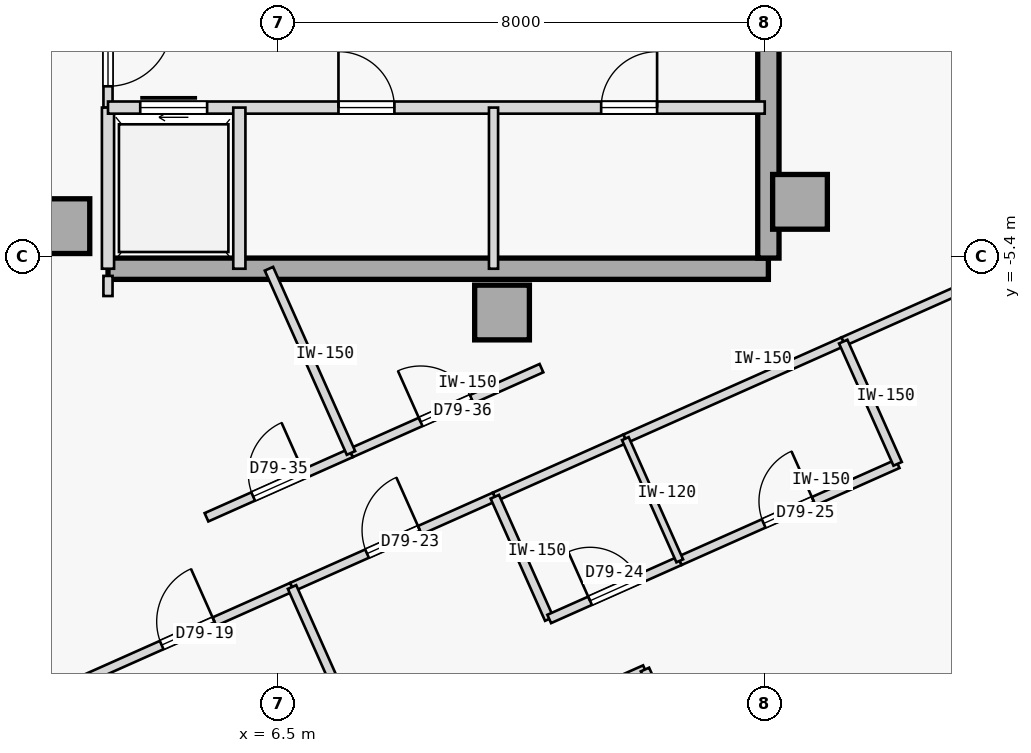
"""IFC4 building model, lengths in metres.
Left out: names, types, materials, properties, quantities, classifications, styles, units other than length and angle.
Written with IfcOpenShell. Run it as: python <this file> out.ifc"""

import sys

from ifc_helpers import new_model, si_unit, direction, frame, frame_2d, origin, origin_2d, place, context, subcontext, project, spatial, rectangle, extrude, element, fill, save


model = new_model("IFC4")
c1 = context("Model", 3, precision=1e-05, world=origin(), true_north=direction((0.0, 1.0)))
c2 = subcontext(c1, "Body", "Model", "MODEL_VIEW")
j1 = project(units=[si_unit("LENGTHUNIT", "METRE"), si_unit("PLANEANGLEUNIT", "RADIAN")], contexts=[c1])
p1 = place(None, origin())
s1 = spatial("IfcSite", under=j1, at=p1, CompositionType="ELEMENT")
p2 = place(p1, origin())
s2 = spatial("IfcBuilding", under=s1, at=p2, CompositionType="ELEMENT")
p3 = place(p2, frame((0.0, 0.0, 295.3)))
s3 = spatial("IfcBuildingStorey", under=s2, at=p3, CompositionType="ELEMENT", Elevation=295.3)
for number, where, z_axis, x_axis in (
    (1, (15.08, -4.5, 0.0), (0.0, 0.0, 1.0), (1.0, 0.0, 0.0)),
    (2, (10.18, -6.32, 0.0), (0.0, 0.0, 1.0), (1.0, 0.0, 0.0)),
    (3, (2.95, -4.9, 0.0), (0.0, 0.0, 1.0), (1.0, 0.0, 0.0)),
):
    element("IfcColumn", number, at=place(p3, frame(where, z_axis=z_axis, x_axis=x_axis)), inside=s3, PredefinedType="COLUMN", context=c2, shape_type="SweptSolid", body=[
        extrude(rectangle(XDim=0.9, YDim=0.9, at=origin_2d()), origin(), (0.0, 0.0, 1.0), 3.35),
    ])
p4 = place(p3, frame((3.7, -5.6, 0.0), z_axis=(0.0, 0.0, 1.0), x_axis=(1.0, 0.0, 0.0)))
e4 = element("IfcWall", 4, at=p4, inside=s3, PredefinedType="SHEAR", context=c2, shape_type="SweptSolid", body=[
    extrude(rectangle(XDim=10.86, YDim=0.35, at=frame_2d((5.43, 0.0))), origin(), (0.0, 0.0, 1.0), 3.125),
])
p5 = place(p3, frame((14.56, -5.425, 0.0), z_axis=(0.0, 0.0, 1.0), x_axis=(0.0, 1.0, 0.0)))
e5 = element("IfcWall", 5, at=p5, inside=s3, PredefinedType="SHEAR", context=c2, shape_type="SweptSolid", body=[
    extrude(rectangle(XDim=10.85, YDim=0.35, at=frame_2d((5.425, 0.0))), origin(), (0.0, 0.0, 1.0), 3.125),
])
p6 = place(p3, frame((3.7, -2.95, 0.0), z_axis=(0.0, 0.0, 1.0), x_axis=(0.0, 1.0, 0.0)))
e6 = element("IfcWall", 6, at=p6, inside=s3, PredefinedType="PARTITIONING", context=c2, shape_type="SweptSolid", body=[
    extrude(rectangle(XDim=1.8, YDim=0.15, at=frame_2d((0.9, 0.0))), origin(), (0.0, 0.0, 1.0), 3.125),
])
p7 = place(p6, frame((0.35, 0.0, 0.0)))
e7 = element("IfcOpeningElement", 7, at=p7, cuts=e6, PredefinedType="OPENING", context=c2, shape_type="SweptSolid", body=[
    extrude(rectangle(XDim=1.05, YDim=2.18, at=frame_2d((0.525, 1.09))), frame((0.0, 0.085, 0.0), z_axis=(0.0, -1.0, 0.0), x_axis=(1.0, 0.0, 0.0)), (0.0, 0.0, 1.0), 0.17),
])
p8 = place(p3, frame((3.7, -5.6, 0.0), z_axis=(0.0, 0.0, 1.0), x_axis=(0.0, 1.0, 0.0)))
e8 = element("IfcWall", 8, at=p8, inside=s3, PredefinedType="STANDARD", context=c2, shape_type="SweptSolid", body=[
    extrude(rectangle(XDim=2.65, YDim=0.2, at=frame_2d((1.325, 0.0))), origin(), (0.0, 0.0, 1.0), 3.125),
])
p9 = place(p3, frame((3.7, -2.95, 0.0), z_axis=(0.0, 0.0, 1.0), x_axis=(1.0, 0.0, 0.0)))
e9 = element("IfcWall", 9, at=p9, inside=s3, PredefinedType="STANDARD", context=c2, shape_type="SweptSolid", body=[
    extrude(rectangle(XDim=10.8, YDim=0.2, at=frame_2d((5.4, 0.0))), origin(), (0.0, 0.0, 1.0), 3.125),
])
p10 = place(p9, frame((0.53, 0.0, 0.0)))
e10 = element("IfcOpeningElement", 10, at=p10, cuts=e9, PredefinedType="OPENING", context=c2, shape_type="SweptSolid", body=[
    extrude(rectangle(XDim=1.1, YDim=2.15, at=frame_2d((0.55, 1.075))), frame((0.0, 0.11, 0.0), z_axis=(0.0, -1.0, 0.0), x_axis=(1.0, 0.0, 0.0)), (0.0, 0.0, 1.0), 0.22),
])
p11 = place(p9, frame((3.79, 0.0, 0.0)))
e11 = element("IfcOpeningElement", 11, at=p11, cuts=e9, PredefinedType="OPENING", context=c2, shape_type="SweptSolid", body=[
    extrude(rectangle(XDim=0.92, YDim=2.15, at=frame_2d((0.46, 1.075))), frame((0.0, 0.11, 0.0), z_axis=(0.0, -1.0, 0.0), x_axis=(1.0, 0.0, 0.0)), (0.0, 0.0, 1.0), 0.22),
])
p12 = place(p9, frame((8.11, 0.0, 0.0)))
e12 = element("IfcOpeningElement", 12, at=p12, cuts=e9, PredefinedType="OPENING", context=c2, shape_type="SweptSolid", body=[
    extrude(rectangle(XDim=0.92, YDim=2.15, at=frame_2d((0.46, 1.075))), frame((0.0, 0.11, 0.0), z_axis=(0.0, -1.0, 0.0), x_axis=(1.0, 0.0, 0.0)), (0.0, 0.0, 1.0), 0.22),
])
p13 = place(p3, frame((5.86, -5.6, 0.0), z_axis=(0.0, 0.0, 1.0), x_axis=(0.0, 1.0, 0.0)))
e13 = element("IfcWall", 13, at=p13, inside=s3, PredefinedType="STANDARD", context=c2, shape_type="SweptSolid", body=[
    extrude(rectangle(XDim=2.65, YDim=0.2, at=frame_2d((1.325, 0.0))), origin(), (0.0, 0.0, 1.0), 3.125),
])
p14 = place(p3, frame((10.04, -5.6, 0.0), z_axis=(0.0, 0.0, 1.0), x_axis=(0.0, 1.0, 0.0)))
e14 = element("IfcWall", 14, at=p14, inside=s3, PredefinedType="PARTITIONING", context=c2, shape_type="SweptSolid", body=[
    extrude(rectangle(XDim=2.65, YDim=0.15, at=frame_2d((1.325, 0.0))), origin(), (0.0, 0.0, 1.0), 3.125),
])
p15 = place(p3, frame((3.306, -12.357, 0.0), z_axis=(0.0, 0.0, 1.0), x_axis=(0.913550513402, 0.406725287464, 0.0)))
e15 = element("IfcWall", 15, at=p15, inside=s3, PredefinedType="PARTITIONING", context=c2, shape_type="SweptSolid", body=[
    extrude(rectangle(XDim=3.744, YDim=0.15, at=frame_2d((1.872, 0.0))), origin(), (0.0, 0.0, 1.0), 3.125),
])
p16 = place(p15, frame((1.397, 0.0, 0.0)))
e16 = element("IfcOpeningElement", 16, at=p16, cuts=e15, PredefinedType="OPENING", context=c2, shape_type="SweptSolid", body=[
    extrude(rectangle(XDim=0.95, YDim=2.15, at=frame_2d((0.475, 1.075))), frame((0.0, 0.085, 0.0), z_axis=(0.0, -1.0, 0.0), x_axis=(1.0, 0.0, 0.0)), (0.0, 0.0, 1.0), 0.17),
])
p17 = place(p3, frame((6.727, -10.834, 0.0), z_axis=(0.0, 0.0, 1.0), x_axis=(0.913543802, 0.40674036169, 0.0)))
e17 = element("IfcWall", 17, at=p17, inside=s3, PredefinedType="PARTITIONING", context=c2, shape_type="SweptSolid", body=[
    extrude(rectangle(XDim=3.65, YDim=0.15, at=frame_2d((1.825, 0.0))), origin(), (0.0, 0.0, 1.0), 3.125),
])
p18 = place(p17, frame((1.35, 0.0, 0.0)))
e18 = element("IfcOpeningElement", 18, at=p18, cuts=e17, PredefinedType="OPENING", context=c2, shape_type="SweptSolid", body=[
    extrude(rectangle(XDim=0.95, YDim=2.15, at=frame_2d((0.475, 1.075))), frame((0.0, 0.085, 0.0), z_axis=(0.0, -1.0, 0.0), x_axis=(1.0, 0.0, 0.0)), (0.0, 0.0, 1.0), 0.17),
])
p19 = place(p3, frame((15.791, -6.799, 0.0), z_axis=(0.0, 0.0, 1.0), x_axis=(0.913543802, 0.40674036169, 0.0)))
e19 = element("IfcWall", 19, at=p19, inside=s3, PredefinedType="PARTITIONING", context=c2, shape_type="SweptSolid", body=[
    extrude(rectangle(XDim=3.65, YDim=0.15, at=frame_2d((1.825, 0.0))), origin(), (0.0, 0.0, 1.0), 3.125),
])
p20 = place(p3, frame((10.061, -9.35, 0.0), z_axis=(0.0, 0.0, 1.0), x_axis=(0.913558622212, 0.406707073682, 0.0)))
e20 = element("IfcWall", 20, at=p20, inside=s3, PredefinedType="PARTITIONING", context=c2, shape_type="SweptSolid", body=[
    extrude(rectangle(XDim=2.35, YDim=0.15, at=frame_2d((1.175, 0.0))), origin(), (0.0, 0.0, 1.0), 3.125),
])
p21 = place(p3, frame((12.208, -8.394, 0.0), z_axis=(0.0, 0.0, 1.0), x_axis=(0.913539234326, 0.406750620585, 0.0)))
e21 = element("IfcWall", 21, at=p21, inside=s3, PredefinedType="PARTITIONING", context=c2, shape_type="SweptSolid", body=[
    extrude(rectangle(XDim=3.922, YDim=0.15, at=frame_2d((1.961, 0.0))), origin(), (0.0, 0.0, 1.0), 3.125),
])
p22 = place(p3, frame((5.32, -9.688, 0.0), z_axis=(0.0, 0.0, 1.0), x_axis=(0.913559784164, 0.406704463658, 0.0)))
e22 = element("IfcWall", 22, at=p22, inside=s3, PredefinedType="PARTITIONING", context=c2, shape_type="SweptSolid", body=[
    extrude(rectangle(XDim=2.601, YDim=0.15, at=frame_2d((1.301, 0.0))), origin(), (0.0, 0.0, 1.0), 3.125),
])
p23 = place(p22, frame((0.841, 0.0, 0.0)))
e23 = element("IfcOpeningElement", 23, at=p23, cuts=e22, PredefinedType="OPENING", context=c2, shape_type="SweptSolid", body=[
    extrude(rectangle(XDim=0.92, YDim=2.15, at=frame_2d((0.46, 1.075))), frame((0.0, 0.085, 0.0), z_axis=(0.0, -1.0, 0.0), x_axis=(1.0, 0.0, 0.0)), (0.0, 0.0, 1.0), 0.17),
])
p24 = place(p3, frame((3.699, -6.049, 0.0), z_axis=(0.0, 0.0, 1.0), x_axis=(0.001476013152, 0.999998910692, 0.0)))
e24 = element("IfcWall", 24, at=p24, inside=s3, PredefinedType="PARTITIONING", context=c2, shape_type="SweptSolid", body=[
    extrude(rectangle(XDim=0.331, YDim=0.15, at=frame_2d((0.166, 0.0))), origin(), (0.0, 0.0, 1.0), 3.125),
])
p25 = place(p3, frame((7.696, -8.63, 0.0), z_axis=(0.0, 0.0, 1.0), x_axis=(0.913526514415, 0.406779187596, 0.0)))
e25 = element("IfcWall", 25, at=p25, inside=s3, PredefinedType="PARTITIONING", context=c2, shape_type="SweptSolid", body=[
    extrude(rectangle(XDim=3.429, YDim=0.15, at=frame_2d((1.714, 0.0))), origin(), (0.0, 0.0, 1.0), 3.125),
])
p26 = place(p25, frame((1.254, 0.0, 0.0)))
e26 = element("IfcOpeningElement", 26, at=p26, cuts=e25, PredefinedType="OPENING", context=c2, shape_type="SweptSolid", body=[
    extrude(rectangle(XDim=0.92, YDim=2.15, at=frame_2d((0.46, 1.075))), frame((0.0, 0.085, 0.0), z_axis=(0.0, -1.0, 0.0), x_axis=(1.0, 0.0, 0.0)), (0.0, 0.0, 1.0), 0.17),
])
p27 = place(p3, frame((10.605, -19.545, 0.0), z_axis=(0.0, 0.0, 1.0), x_axis=(-0.406760810574, 0.913534697196, 0.0)))
e27 = element("IfcWall", 27, at=p27, inside=s3, PredefinedType="PARTITIONING", context=c2, shape_type="SweptSolid", body=[
    extrude(rectangle(XDim=9.535, YDim=0.15, at=frame_2d((4.768, 0.0))), origin(), (0.0, 0.0, 1.0), 3.125),
])
p28 = place(p3, frame((10.956, -11.36, 0.0), z_axis=(0.0, 0.0, 1.0), x_axis=(-0.406725294076, 0.913550510459, 0.0)))
e28 = element("IfcWall", 28, at=p28, inside=s3, PredefinedType="PARTITIONING", context=c2, shape_type="SweptSolid", body=[
    extrude(rectangle(XDim=2.2, YDim=0.15, at=frame_2d((1.1, 0.0))), origin(), (0.0, 0.0, 1.0), 3.125),
])
p29 = place(p3, frame((10.956, -11.36, 0.0), z_axis=(0.0, 0.0, 1.0), x_axis=(0.913558622212, 0.406707073682, 0.0)))
e29 = element("IfcWall", 29, at=p29, inside=s3, PredefinedType="PARTITIONING", context=c2, shape_type="SweptSolid", body=[
    extrude(rectangle(XDim=2.35, YDim=0.15, at=frame_2d((1.175, 0.0))), origin(), (0.0, 0.0, 1.0), 3.125),
])
p30 = place(p29, frame((0.735, 0.0, 0.0)))
e30 = element("IfcOpeningElement", 30, at=p30, cuts=e29, PredefinedType="OPENING", context=c2, shape_type="SweptSolid", body=[
    extrude(rectangle(XDim=0.88, YDim=2.15, at=frame_2d((0.44, 1.075))), frame((0.0, 0.085, 0.0), z_axis=(0.0, -1.0, 0.0), x_axis=(1.0, 0.0, 0.0)), (0.0, 0.0, 1.0), 0.17),
])
p31 = place(p3, frame((13.103, -10.404, 0.0), z_axis=(0.0, 0.0, 1.0), x_axis=(0.913549532696, 0.406727490232, 0.0)))
e31 = element("IfcWall", 31, at=p31, inside=s3, PredefinedType="PARTITIONING", context=c2, shape_type="SweptSolid", body=[
    extrude(rectangle(XDim=3.922, YDim=0.15, at=frame_2d((1.961, 0.0))), origin(), (0.0, 0.0, 1.0), 3.125),
])
p32 = place(p31, frame((1.511, 0.0, 0.0)))
e32 = element("IfcOpeningElement", 32, at=p32, cuts=e31, PredefinedType="OPENING", context=c2, shape_type="SweptSolid", body=[
    extrude(rectangle(XDim=0.9, YDim=2.15, at=frame_2d((0.45, 1.075))), frame((0.0, 0.085, 0.0), z_axis=(0.0, -1.0, 0.0), x_axis=(1.0, 0.0, 0.0)), (0.0, 0.0, 1.0), 0.17),
])
p33 = place(p3, frame((16.686, -8.809, 0.0), z_axis=(0.0, 0.0, 1.0), x_axis=(-0.406817905151, 0.913509273105, 0.0)))
e33 = element("IfcWall", 33, at=p33, inside=s3, PredefinedType="PARTITIONING", context=c2, shape_type="SweptSolid", body=[
    extrude(rectangle(XDim=2.2, YDim=0.15, at=frame_2d((1.1, 0.0))), origin(), (0.0, 0.0, 1.0), 3.125),
])
p34 = place(p3, frame((8.282, -14.083, 0.0), z_axis=(0.0, 0.0, 1.0), x_axis=(0.91354505039, 0.40673755778, 0.0)))
e34 = element("IfcWall", 34, at=p34, inside=s3, PredefinedType="PARTITIONING", context=c2, shape_type="SweptSolid", body=[
    extrude(rectangle(XDim=4.65, YDim=0.15, at=frame_2d((2.325, 0.0))), origin(), (0.0, 0.0, 1.0), 3.125),
])
p35 = place(p3, frame((14.944, -17.613, 0.0), z_axis=(0.0, 0.0, 1.0), x_axis=(-0.406714717734, 0.913555219119, 0.0)))
e35 = element("IfcWall", 35, at=p35, inside=s3, PredefinedType="PARTITIONING", context=c2, shape_type="SweptSolid", body=[
    extrude(rectangle(XDim=5.935, YDim=0.15, at=frame_2d((2.967, 0.0))), origin(), (0.0, 0.0, 1.0), 2.675),
])
p36 = place(p35, frame((2.518, 0.0, 0.0)))
e36 = element("IfcOpeningElement", 36, at=p36, cuts=e35, PredefinedType="OPENING", context=c2, shape_type="SweptSolid", body=[
    extrude(rectangle(XDim=0.9, YDim=2.15, at=frame_2d((0.45, 1.075))), frame((0.0, 0.085, 0.0), z_axis=(0.0, -1.0, 0.0), x_axis=(1.0, 0.0, 0.0)), (0.0, 0.0, 1.0), 0.17),
])
p37 = place(p3, frame((13.103, -10.404, 0.0), z_axis=(0.0, 0.0, 1.0), x_axis=(-0.406725294076, 0.913550510459, 0.0)))
e37 = element("IfcWall", 37, at=p37, inside=s3, PredefinedType="PARTITIONING", context=c2, shape_type="SweptSolid", body=[
    extrude(rectangle(XDim=2.2, YDim=0.12, at=frame_2d((1.1, 0.0))), origin(), (0.0, 0.0, 1.0), 3.125),
])
p38 = place(p3, frame((7.696, -8.63, 0.0), z_axis=(0.0, 0.0, 1.0), x_axis=(-0.406773661192, 0.913528975217, 0.0)))
e38 = element("IfcWall", 38, at=p38, inside=s3, PredefinedType="PARTITIONING", context=c2, shape_type="SweptSolid", body=[
    extrude(rectangle(XDim=3.316, YDim=0.15, at=frame_2d((1.658, 0.0))), origin(), (0.0, 0.0, 1.0), 3.125),
])
p39 = place(p7, frame((1.05, 0.0, 0.0), z_axis=(0.0, 0.0, 1.0), x_axis=(-1.0, 0.0, 0.0)))
e39 = element("IfcDoor", 39, at=p39, inside=s3, OperationType="SINGLE_SWING_RIGHT", PredefinedType="DOOR", context=c2, shape_type="SweptSolid", body=[
    extrude(rectangle(XDim=1.05, YDim=2.18, at=frame_2d((0.525, 1.09))), frame((0.0, 0.025, 0.0), z_axis=(0.0, -1.0, 0.0), x_axis=(1.0, 0.0, 0.0)), (0.0, 0.0, 1.0), 0.05),
])
fill(e7, e39)
p40 = place(p10, origin())
e40 = element("IfcDoor", 40, at=p40, inside=s3, OperationType="SLIDING_TO_RIGHT", PredefinedType="DOOR", context=c2, shape_type="SweptSolid", body=[
    extrude(rectangle(XDim=1.1, YDim=2.15, at=frame_2d((0.55, 1.075))), frame((0.0, 0.025, 0.0), z_axis=(0.0, -1.0, 0.0), x_axis=(1.0, 0.0, 0.0)), (0.0, 0.0, 1.0), 0.05),
])
fill(e10, e40)
p41 = place(p11, origin())
e41 = element("IfcDoor", 41, at=p41, inside=s3, OperationType="SINGLE_SWING_LEFT", PredefinedType="DOOR", context=c2, shape_type="SweptSolid", body=[
    extrude(rectangle(XDim=0.92, YDim=2.15, at=frame_2d((0.46, 1.075))), frame((0.0, 0.025, 0.0), z_axis=(0.0, -1.0, 0.0), x_axis=(1.0, 0.0, 0.0)), (0.0, 0.0, 1.0), 0.05),
])
fill(e11, e41)
p42 = place(p12, origin())
e42 = element("IfcDoor", 42, at=p42, inside=s3, OperationType="SINGLE_SWING_RIGHT", PredefinedType="DOOR", context=c2, shape_type="SweptSolid", body=[
    extrude(rectangle(XDim=0.92, YDim=2.15, at=frame_2d((0.46, 1.075))), frame((0.0, 0.025, 0.0), z_axis=(0.0, -1.0, 0.0), x_axis=(1.0, 0.0, 0.0)), (0.0, 0.0, 1.0), 0.05),
])
fill(e12, e42)
p43 = place(p16, origin())
e43 = element("IfcDoor", 43, at=p43, inside=s3, OperationType="SINGLE_SWING_RIGHT", PredefinedType="DOOR", context=c2, shape_type="SweptSolid", body=[
    extrude(rectangle(XDim=0.95, YDim=2.15, at=frame_2d((0.475, 1.075))), frame((0.0, 0.025, 0.0), z_axis=(0.0, -1.0, 0.0), x_axis=(1.0, 0.0, 0.0)), (0.0, 0.0, 1.0), 0.05),
])
fill(e16, e43)
p44 = place(p18, origin())
e44 = element("IfcDoor", 44, at=p44, inside=s3, OperationType="SINGLE_SWING_RIGHT", PredefinedType="DOOR", context=c2, shape_type="SweptSolid", body=[
    extrude(rectangle(XDim=0.95, YDim=2.15, at=frame_2d((0.475, 1.075))), frame((0.0, 0.025, 0.0), z_axis=(0.0, -1.0, 0.0), x_axis=(1.0, 0.0, 0.0)), (0.0, 0.0, 1.0), 0.05),
])
fill(e18, e44)
p45 = place(p30, origin())
e45 = element("IfcDoor", 45, at=p45, inside=s3, OperationType="SINGLE_SWING_LEFT", PredefinedType="DOOR", context=c2, shape_type="SweptSolid", body=[
    extrude(rectangle(XDim=0.88, YDim=2.15, at=frame_2d((0.44, 1.075))), frame((0.0, 0.025, 0.0), z_axis=(0.0, -1.0, 0.0), x_axis=(1.0, 0.0, 0.0)), (0.0, 0.0, 1.0), 0.05),
])
fill(e30, e45)
p46 = place(p32, origin())
e46 = element("IfcDoor", 46, at=p46, inside=s3, OperationType="SINGLE_SWING_RIGHT", PredefinedType="DOOR", context=c2, shape_type="SweptSolid", body=[
    extrude(rectangle(XDim=0.9, YDim=2.15, at=frame_2d((0.45, 1.075))), frame((0.0, 0.025, 0.0), z_axis=(0.0, -1.0, 0.0), x_axis=(1.0, 0.0, 0.0)), (0.0, 0.0, 1.0), 0.05),
])
fill(e32, e46)
p47 = place(p23, origin())
e47 = element("IfcDoor", 47, at=p47, inside=s3, OperationType="SINGLE_SWING_RIGHT", PredefinedType="DOOR", context=c2, shape_type="SweptSolid", body=[
    extrude(rectangle(XDim=0.92, YDim=2.15, at=frame_2d((0.46, 1.075))), frame((0.0, 0.025, 0.0), z_axis=(0.0, -1.0, 0.0), x_axis=(1.0, 0.0, 0.0)), (0.0, 0.0, 1.0), 0.05),
])
fill(e23, e47)
p48 = place(p26, origin())
e48 = element("IfcDoor", 48, at=p48, inside=s3, OperationType="SINGLE_SWING_LEFT", PredefinedType="DOOR", context=c2, shape_type="SweptSolid", body=[
    extrude(rectangle(XDim=0.92, YDim=2.15, at=frame_2d((0.46, 1.075))), frame((0.0, 0.025, 0.0), z_axis=(0.0, -1.0, 0.0), x_axis=(1.0, 0.0, 0.0)), (0.0, 0.0, 1.0), 0.05),
])
fill(e26, e48)
save(model, sys.argv[1])
